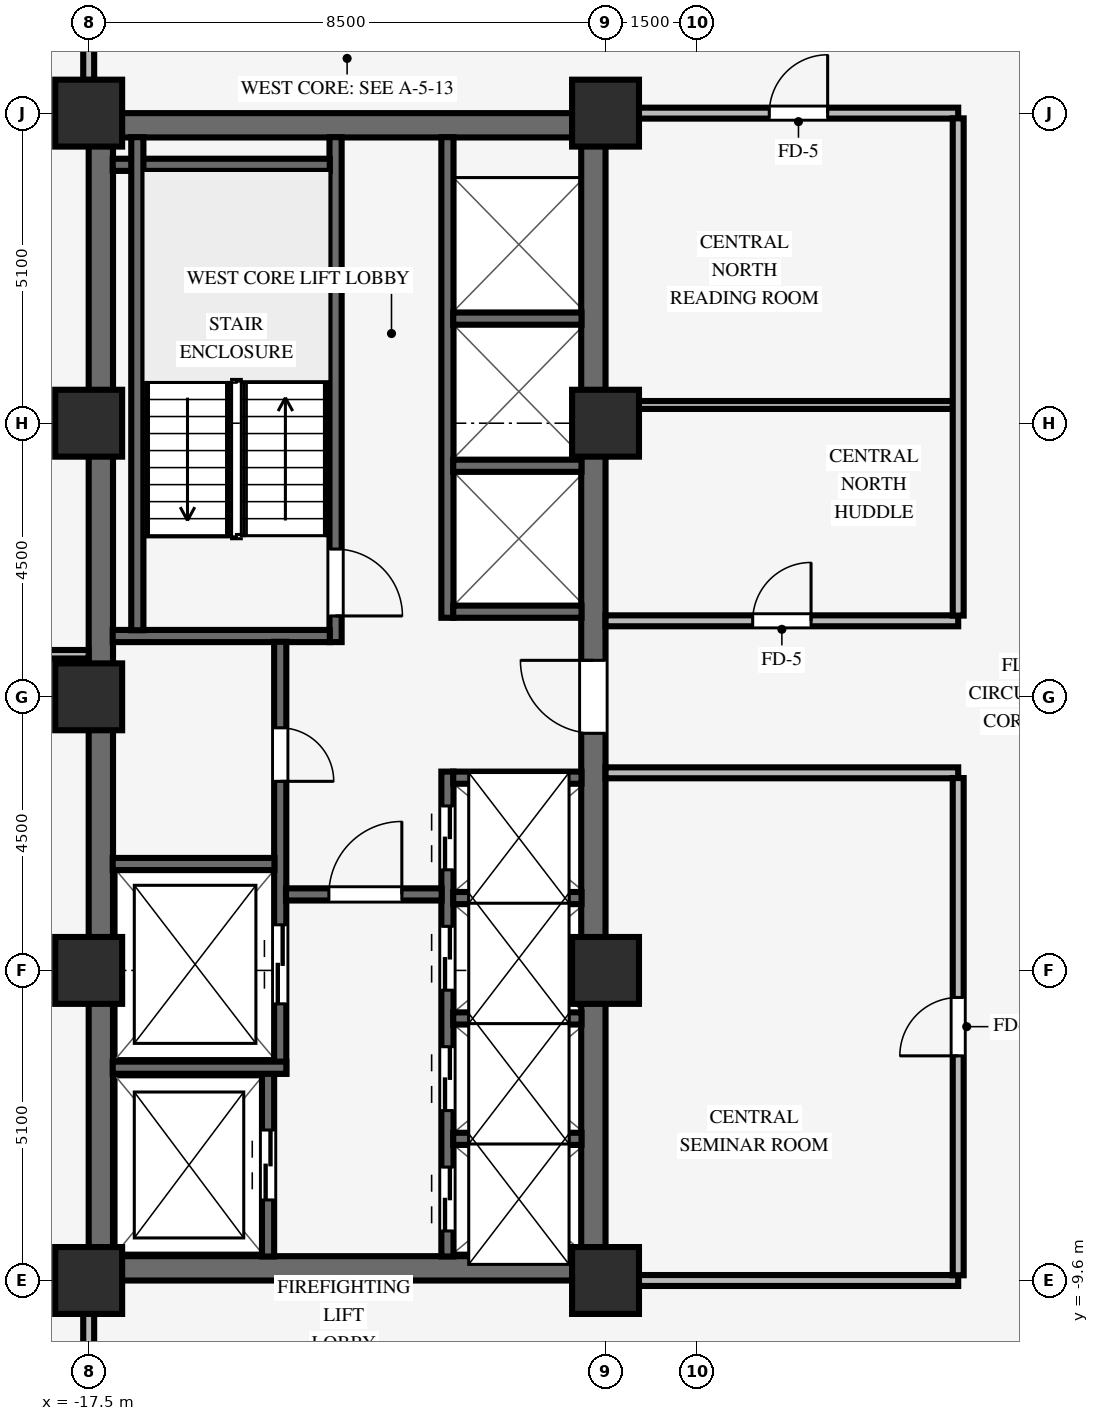
"""IFC4 building model, lengths in metres.
Left out: names, types, materials, properties, quantities, classifications, styles, units other than length and angle.
Written with IfcOpenShell. Run it as: python <this file> out.ifc"""

import sys

from ifc_helpers import new_model, si_unit, direction, frame, frame_2d, origin, origin_2d, place, context, subcontext, project, spatial, rectangle, extrude, source, transform, mapped, element, fill, save


model = new_model("IFC4")
c1 = context("Model", 3, precision=1e-05, world=origin(), true_north=direction((0.0, 1.0)))
c2 = subcontext(c1, "Body", "Model", "MODEL_VIEW")
j1 = project(units=[si_unit("LENGTHUNIT", "METRE"), si_unit("PLANEANGLEUNIT", "RADIAN")], contexts=[c1])
p1 = place(None, origin())
s1 = spatial("IfcSite", under=j1, at=p1, CompositionType="ELEMENT")
p2 = place(p1, origin())
s2 = spatial("IfcBuilding", under=s1, at=p2, CompositionType="ELEMENT")
p3 = place(p2, frame((0.0, 0.0, 105.6)))
s3 = spatial("IfcBuildingStorey", under=s2, at=p3, CompositionType="ELEMENT", Elevation=105.6)
for number, where, z_axis, x_axis in (
    (1, (-17.5, -9.4, 0.0), (0.0, 0.0, 1.0), (1.0, 0.0, 0.0)),
    (2, (-17.5, 9.4, 0.0), (0.0, 0.0, 1.0), (1.0, 0.0, 0.0)),
):
    element("IfcWall", number, at=place(p3, frame(where, z_axis=z_axis, x_axis=x_axis)), inside=s3, PredefinedType="SHEAR", context=c2, shape_type="SweptSolid", body=[
        extrude(rectangle(XDim=8.5, YDim=0.4, at=frame_2d((4.25, 0.0))), origin(), (0.0, 0.0, 1.0), 3.37),
    ])
p4 = place(p3, frame((-17.3, -9.205, 0.0), z_axis=(0.0, 0.0, 1.0), x_axis=(0.0, 1.0, 0.0)))
e3 = element("IfcWall", 3, at=p4, inside=s3, PredefinedType="SHEAR", context=c2, shape_type="SweptSolid", body=[
    extrude(rectangle(XDim=18.41, YDim=0.4, at=frame_2d((9.205, 0.0))), origin(), (0.0, 0.0, 1.0), 3.37),
])
p5 = place(p3, frame((-9.2, -9.205, 0.0), z_axis=(0.0, 0.0, 1.0), x_axis=(0.0, 1.0, 0.0)))
e4 = element("IfcWall", 4, at=p5, inside=s3, PredefinedType="SHEAR", context=c2, shape_type="SweptSolid", body=[
    extrude(rectangle(XDim=18.41, YDim=0.4, at=frame_2d((9.205, 0.0))), origin(), (0.0, 0.0, 1.0), 3.37),
])
p6 = place(p5, frame((8.605, 0.0, 0.0)))
e5 = element("IfcOpeningElement", 5, at=p6, cuts=e4, PredefinedType="OPENING", context=c2, shape_type="SweptSolid", body=[
    extrude(rectangle(XDim=1.2, YDim=2.15, at=frame_2d((0.6, 1.075))), frame((0.0, 0.21, 0.0), z_axis=(0.0, -1.0, 0.0), x_axis=(1.0, 0.0, 0.0)), (0.0, 0.0, 1.0), 0.42),
])
for number, where, z_axis, x_axis in (
    (6, (-17.5, -9.6, 0.0), (0.0, 0.0, 1.0), (1.0, 0.0, 0.0)),
    (7, (-17.5, -4.5, 0.0), (0.0, 0.0, 1.0), (1.0, 0.0, 0.0)),
    (8, (-17.5, 4.5, 0.0), (0.0, 0.0, 1.0), (1.0, 0.0, 0.0)),
    (9, (-17.5, 9.6, 0.0), (0.0, 0.0, 1.0), (1.0, 0.0, 0.0)),
    (10, (-9.0, -9.6, 0.0), (0.0, 0.0, 1.0), (1.0, 0.0, 0.0)),
    (11, (-9.0, -4.5, 0.0), (0.0, 0.0, 1.0), (1.0, 0.0, 0.0)),
    (12, (-9.0, 4.5, 0.0), (0.0, 0.0, 1.0), (1.0, 0.0, 0.0)),
    (13, (-9.0, 9.6, 0.0), (0.0, 0.0, 1.0), (1.0, 0.0, 0.0)),
    (14, (-17.5, 0.0, 0.0), (0.0, 0.0, 1.0), (1.0, 0.0, 0.0)),
):
    element("IfcColumn", number, at=place(p3, frame(where, z_axis=z_axis, x_axis=x_axis)), inside=s3, PredefinedType="COLUMN", context=c2, shape_type="SweptSolid", body=[
        extrude(rectangle(XDim=1.1, YDim=1.1, at=origin_2d()), origin(), (0.0, 0.0, 1.0), 3.37),
    ])
p7 = place(p3, frame((-13.44, 0.9, 0.0), z_axis=(0.0, 0.0, 1.0), x_axis=(0.0, 1.0, 0.0)))
e15 = element("IfcWall", 15, at=p7, inside=s3, PredefinedType="SHEAR", context=c2, shape_type="SweptSolid", body=[
    extrude(rectangle(XDim=8.305, YDim=0.2, at=frame_2d((4.153, 0.0))), origin(), (0.0, 0.0, 1.0), 3.37),
])
p8 = place(p7, frame((1.53, 0.0, 0.0), z_axis=(0.0, 0.0, 1.0), x_axis=(-1.0, 0.0, 0.0)))
e16 = element("IfcOpeningElement", 16, at=p8, cuts=e15, PredefinedType="OPENING", context=c2, shape_type="SweptSolid", body=[
    extrude(rectangle(XDim=1.1, YDim=2.15, at=frame_2d((0.55, 1.075))), frame((0.0, 0.11, 0.0), z_axis=(0.0, -1.0, 0.0), x_axis=(1.0, 0.0, 0.0)), (0.0, 0.0, 1.0), 0.22),
])
for number, where, z_axis, x_axis in (
    (17, (-17.105, 1.0, 0.0), (0.0, 0.0, 1.0), (1.0, 0.0, 0.0)),
    (18, (-17.105, 8.75, 0.0), (0.0, 0.0, 1.0), (1.0, 0.0, 0.0)),
):
    element("IfcWall", number, at=place(p3, frame(where, z_axis=z_axis, x_axis=x_axis)), inside=s3, PredefinedType="SHEAR", context=c2, shape_type="SweptSolid", body=[
        extrude(rectangle(XDim=3.57, YDim=0.2, at=frame_2d((1.785, 0.0))), origin(), (0.0, 0.0, 1.0), 3.37),
    ])
p9 = place(p3, frame((-16.7, 1.095, 0.0), z_axis=(0.0, 0.0, 1.0), x_axis=(0.0, 1.0, 0.0)))
e19 = element("IfcWall", 19, at=p9, inside=s3, PredefinedType="SHEAR", context=c2, shape_type="SweptSolid", body=[
    extrude(rectangle(XDim=8.11, YDim=0.2, at=frame_2d((4.055, 0.0))), origin(), (0.0, 0.0, 1.0), 3.37),
])
p10 = place(p3, frame((-14.55, -9.205, 0.0), z_axis=(0.0, 0.0, 1.0), x_axis=(0.0, 1.0, 0.0)))
e20 = element("IfcWall", 20, at=p10, inside=s3, PredefinedType="SHEAR", context=c2, shape_type="SweptSolid", body=[
    extrude(rectangle(XDim=3.01, YDim=0.2, at=frame_2d((1.505, 0.0))), origin(), (0.0, 0.0, 1.0), 3.37),
])
p11 = place(p10, frame((0.93, 0.0, 0.0)))
e21 = element("IfcOpeningElement", 21, at=p11, cuts=e20, PredefinedType="OPENING", context=c2, shape_type="SweptSolid", body=[
    extrude(rectangle(XDim=1.15, YDim=2.15, at=frame_2d((0.575, 1.075))), frame((0.0, 0.11, 0.0), z_axis=(0.0, -1.0, 0.0), x_axis=(1.0, 0.0, 0.0)), (0.0, 0.0, 1.0), 0.22),
])
p12 = place(p3, frame((-14.35, -6.2, 0.0), z_axis=(0.0, 0.0, 1.0), x_axis=(0.0, 1.0, 0.0)))
e22 = element("IfcWall", 22, at=p12, inside=s3, PredefinedType="SHEAR", context=c2, shape_type="SweptSolid", body=[
    extrude(rectangle(XDim=7.105, YDim=0.2, at=frame_2d((3.552, 0.0))), origin(), (0.0, 0.0, 1.0), 3.37),
])
p13 = place(p12, frame((5.69, 0.0, 0.0), z_axis=(0.0, 0.0, 1.0), x_axis=(-1.0, 0.0, 0.0)))
e23 = element("IfcOpeningElement", 23, at=p13, cuts=e22, PredefinedType="OPENING", context=c2, shape_type="SweptSolid", body=[
    extrude(rectangle(XDim=0.88, YDim=2.1, at=frame_2d((0.44, 1.05))), frame((0.0, 0.11, 0.0), z_axis=(0.0, -1.0, 0.0), x_axis=(1.0, 0.0, 0.0)), (0.0, 0.0, 1.0), 0.22),
])
p14 = place(p12, frame((1.15, 0.0, 0.0)))
e24 = element("IfcOpeningElement", 24, at=p14, cuts=e22, PredefinedType="OPENING", context=c2, shape_type="SweptSolid", body=[
    extrude(rectangle(XDim=1.3, YDim=2.2, at=frame_2d((0.65, 1.1))), frame((0.0, 0.11, 0.0), z_axis=(0.0, -1.0, 0.0), x_axis=(1.0, 0.0, 0.0)), (0.0, 0.0, 1.0), 0.22),
])
p15 = place(p3, frame((-17.105, -6.1, 0.0), z_axis=(0.0, 0.0, 1.0), x_axis=(1.0, 0.0, 0.0)))
e25 = element("IfcWall", 25, at=p15, inside=s3, PredefinedType="SHEAR", context=c2, shape_type="SweptSolid", body=[
    extrude(rectangle(XDim=2.855, YDim=0.2, at=frame_2d((1.427, 0.0))), origin(), (0.0, 0.0, 1.0), 3.37),
])
p16 = place(p3, frame((-17.105, -2.75, 0.0), z_axis=(0.0, 0.0, 1.0), x_axis=(1.0, 0.0, 0.0)))
e26 = element("IfcWall", 26, at=p16, inside=s3, PredefinedType="SHEAR", context=c2, shape_type="SweptSolid", body=[
    extrude(rectangle(XDim=2.66, YDim=0.2, at=frame_2d((1.33, 0.0))), origin(), (0.0, 0.0, 1.0), 3.37),
])
p17 = place(p3, frame((-11.6, -9.205, 0.0), z_axis=(0.0, 0.0, 1.0), x_axis=(0.0, 1.0, 0.0)))
e27 = element("IfcWall", 27, at=p17, inside=s3, PredefinedType="SHEAR", context=c2, shape_type="SweptSolid", body=[
    extrude(rectangle(XDim=7.975, YDim=0.2, at=frame_2d((3.988, 0.0))), origin(), (0.0, 0.0, 1.0), 3.37),
])
p18 = place(p17, frame((0.42, 0.0, 0.0)))
e28 = element("IfcOpeningElement", 28, at=p18, cuts=e27, PredefinedType="OPENING", context=c2, shape_type="SweptSolid", body=[
    extrude(rectangle(XDim=1.05, YDim=2.15, at=frame_2d((0.525, 1.075))), frame((0.0, 0.11, 0.0), z_axis=(0.0, -1.0, 0.0), x_axis=(1.0, 0.0, 0.0)), (0.0, 0.0, 1.0), 0.22),
])
p19 = place(p17, frame((2.4, 0.0, 0.0)))
e29 = element("IfcOpeningElement", 29, at=p19, cuts=e27, PredefinedType="OPENING", context=c2, shape_type="SweptSolid", body=[
    extrude(rectangle(XDim=1.05, YDim=2.15, at=frame_2d((0.525, 1.075))), frame((0.0, 0.11, 0.0), z_axis=(0.0, -1.0, 0.0), x_axis=(1.0, 0.0, 0.0)), (0.0, 0.0, 1.0), 0.22),
])
p20 = place(p17, frame((4.38, 0.0, 0.0)))
e30 = element("IfcOpeningElement", 30, at=p20, cuts=e27, PredefinedType="OPENING", context=c2, shape_type="SweptSolid", body=[
    extrude(rectangle(XDim=1.05, YDim=2.15, at=frame_2d((0.525, 1.075))), frame((0.0, 0.11, 0.0), z_axis=(0.0, -1.0, 0.0), x_axis=(1.0, 0.0, 0.0)), (0.0, 0.0, 1.0), 0.22),
])
p21 = place(p17, frame((6.36, 0.0, 0.0)))
e31 = element("IfcOpeningElement", 31, at=p21, cuts=e27, PredefinedType="OPENING", context=c2, shape_type="SweptSolid", body=[
    extrude(rectangle(XDim=1.05, YDim=2.15, at=frame_2d((0.525, 1.075))), frame((0.0, 0.11, 0.0), z_axis=(0.0, -1.0, 0.0), x_axis=(1.0, 0.0, 0.0)), (0.0, 0.0, 1.0), 0.22),
])
p22 = place(p3, frame((-14.255, -3.25, 0.0), z_axis=(0.0, 0.0, 1.0), x_axis=(1.0, 0.0, 0.0)))
e32 = element("IfcWall", 32, at=p22, inside=s3, PredefinedType="SHEAR", context=c2, shape_type="SweptSolid", body=[
    extrude(rectangle(XDim=2.56, YDim=0.2, at=frame_2d((1.28, 0.0))), origin(), (0.0, 0.0, 1.0), 3.37),
])
p23 = place(p22, frame((0.705, 0.0, 0.0)))
e33 = element("IfcOpeningElement", 33, at=p23, cuts=e32, PredefinedType="OPENING", context=c2, shape_type="SweptSolid", body=[
    extrude(rectangle(XDim=1.2, YDim=2.15, at=frame_2d((0.6, 1.075))), frame((0.0, 0.11, 0.0), z_axis=(0.0, -1.0, 0.0), x_axis=(1.0, 0.0, 0.0)), (0.0, 0.0, 1.0), 0.22),
])
for number, where, z_axis, x_axis in (
    (34, (-11.505, -7.27, 0.0), (0.0, 0.0, 1.0), (1.0, 0.0, 0.0)),
    (35, (-11.505, -5.29, 0.0), (0.0, 0.0, 1.0), (1.0, 0.0, 0.0)),
    (36, (-11.505, -3.31, 0.0), (0.0, 0.0, 1.0), (1.0, 0.0, 0.0)),
    (37, (-11.505, -1.33, 0.0), (0.0, 0.0, 1.0), (1.0, 0.0, 0.0)),
):
    element("IfcWall", number, at=place(p3, frame(where, z_axis=z_axis, x_axis=x_axis)), inside=s3, PredefinedType="SHEAR", context=c2, shape_type="SweptSolid", body=[
        extrude(rectangle(XDim=2.11, YDim=0.2, at=frame_2d((1.055, 0.0))), origin(), (0.0, 0.0, 1.0), 3.37),
    ])
p24 = place(p3, frame((-11.6, 1.3, 0.0), z_axis=(0.0, 0.0, 1.0), x_axis=(0.0, 1.0, 0.0)))
e38 = element("IfcWall", 38, at=p24, inside=s3, PredefinedType="SHEAR", context=c2, shape_type="SweptSolid", body=[
    extrude(rectangle(XDim=7.905, YDim=0.2, at=frame_2d((3.953, 0.0))), origin(), (0.0, 0.0, 1.0), 3.37),
])
for number, where, z_axis, x_axis in (
    (39, (-11.505, 1.4, 0.0), (0.0, 0.0, 1.0), (1.0, 0.0, 0.0)),
    (40, (-11.505, 3.8, 0.0), (0.0, 0.0, 1.0), (1.0, 0.0, 0.0)),
    (41, (-11.505, 6.22, 0.0), (0.0, 0.0, 1.0), (1.0, 0.0, 0.0)),
):
    element("IfcWall", number, at=place(p3, frame(where, z_axis=z_axis, x_axis=x_axis)), inside=s3, PredefinedType="SHEAR", context=c2, shape_type="SweptSolid", body=[
        extrude(rectangle(XDim=2.11, YDim=0.2, at=frame_2d((1.055, 0.0))), origin(), (0.0, 0.0, 1.0), 3.37),
    ])
p25 = place(p3, frame((-8.454, -9.6, 0.0), z_axis=(0.0, 0.0, 1.0), x_axis=(1.0, 0.0, 0.0)))
e42 = element("IfcWall", 42, at=p25, inside=s3, PredefinedType="PARTITIONING", context=c2, shape_type="SweptSolid", body=[
    extrude(rectangle(XDim=5.254, YDim=0.18, at=frame_2d((2.627, 0.0))), origin(), (0.0, 0.0, 1.0), 2.405),
])
p26 = place(p3, frame((-9.0, -1.25, 0.0), z_axis=(0.0, 0.0, 1.0), x_axis=(1.0, 0.0, 0.0)))
e43 = element("IfcWall", 43, at=p26, inside=s3, PredefinedType="PARTITIONING", context=c2, shape_type="SweptSolid", body=[
    extrude(rectangle(XDim=5.8, YDim=0.18, at=frame_2d((2.9, 0.0))), origin(), (0.0, 0.0, 1.0), 3.36),
])
p27 = place(p3, frame((-23.68, 0.7, 0.0), z_axis=(0.0, 0.0, 1.0), x_axis=(1.0, 0.0, 0.0)))
e44 = element("IfcWall", 44, at=p27, inside=s3, PredefinedType="PARTITIONING", context=c2, shape_type="SweptSolid", body=[
    extrude(rectangle(XDim=6.18, YDim=0.14, at=frame_2d((3.09, 0.0))), origin(), (0.0, 0.0, 1.0), 3.36),
])
p28 = place(p3, frame((-9.0, 1.25, 0.0), z_axis=(0.0, 0.0, 1.0), x_axis=(1.0, 0.0, 0.0)))
e45 = element("IfcWall", 45, at=p28, inside=s3, PredefinedType="PARTITIONING", context=c2, shape_type="SweptSolid", body=[
    extrude(rectangle(XDim=5.8, YDim=0.18, at=frame_2d((2.9, 0.0))), origin(), (0.0, 0.0, 1.0), 3.36),
])
p29 = place(p28, frame((2.42, 0.0, 0.0)))
e46 = element("IfcOpeningElement", 46, at=p29, cuts=e45, PredefinedType="OPENING", context=c2, shape_type="SweptSolid", body=[
    extrude(rectangle(XDim=0.96, YDim=2.1, at=frame_2d((0.48, 1.05))), frame((0.0, 0.1, 0.0), z_axis=(0.0, -1.0, 0.0), x_axis=(1.0, 0.0, 0.0)), (0.0, 0.0, 1.0), 0.2),
])
p30 = place(p3, frame((-8.454, 4.8, 0.0), z_axis=(0.0, 0.0, 1.0), x_axis=(1.0, 0.0, 0.0)))
e47 = element("IfcWall", 47, at=p30, inside=s3, PredefinedType="PARTITIONING", context=c2, shape_type="SweptSolid", body=[
    extrude(rectangle(XDim=5.168, YDim=0.13, at=frame_2d((2.584, 0.0))), origin(), (0.0, 0.0, 1.0), 2.738),
])
p31 = place(p3, frame((-8.454, 9.6, 0.0), z_axis=(0.0, 0.0, 1.0), x_axis=(1.0, 0.0, 0.0)))
e48 = element("IfcWall", 48, at=p31, inside=s3, PredefinedType="PARTITIONING", context=c2, shape_type="SweptSolid", body=[
    extrude(rectangle(XDim=5.254, YDim=0.18, at=frame_2d((2.627, 0.0))), origin(), (0.0, 0.0, 1.0), 2.405),
])
p32 = place(p31, frame((2.147, 0.0, 0.0)))
e49 = element("IfcOpeningElement", 49, at=p32, cuts=e48, PredefinedType="OPENING", context=c2, shape_type="SweptSolid", body=[
    extrude(rectangle(XDim=0.96, YDim=2.1, at=frame_2d((0.48, 1.05))), frame((0.0, 0.1, 0.0), z_axis=(0.0, -1.0, 0.0), x_axis=(1.0, 0.0, 0.0)), (0.0, 0.0, 1.0), 0.2),
])
for number, where, z_axis, x_axis in (
    (50, (-17.5, -11.114, 0.0), (0.0, 0.0, 1.0), (0.0, 1.0, 0.0)),
    (51, (-17.5, 10.146, 0.0), (0.0, 0.0, 1.0), (0.0, 1.0, 0.0)),
):
    element("IfcWall", number, at=place(p3, frame(where, z_axis=z_axis, x_axis=x_axis)), inside=s3, PredefinedType="PARTITIONING", context=c2, shape_type="SweptSolid", body=[
        extrude(rectangle(XDim=0.968, YDim=0.18, at=frame_2d((0.484, 0.0))), origin(), (0.0, 0.0, 1.0), 2.738),
    ])
p33 = place(p3, frame((-3.2, -9.514, 0.0), z_axis=(0.0, 0.0, 1.0), x_axis=(0.0, 1.0, 0.0)))
e52 = element("IfcWall", 52, at=p33, inside=s3, PredefinedType="PARTITIONING", context=c2, shape_type="SweptSolid", body=[
    extrude(rectangle(XDim=8.178, YDim=0.18, at=frame_2d((4.089, 0.0))), origin(), (0.0, 0.0, 1.0), 3.36),
])
p34 = place(p33, frame((3.609, 0.0, 0.0)))
e53 = element("IfcOpeningElement", 53, at=p34, cuts=e52, PredefinedType="OPENING", context=c2, shape_type="SweptSolid", body=[
    extrude(rectangle(XDim=0.96, YDim=2.1, at=frame_2d((0.48, 1.05))), frame((0.0, 0.1, 0.0), z_axis=(0.0, -1.0, 0.0), x_axis=(1.0, 0.0, 0.0)), (0.0, 0.0, 1.0), 0.2),
])
p35 = place(p3, frame((-3.2, 1.336, 0.0), z_axis=(0.0, 0.0, 1.0), x_axis=(0.0, 1.0, 0.0)))
e54 = element("IfcWall", 54, at=p35, inside=s3, PredefinedType="PARTITIONING", context=c2, shape_type="SweptSolid", body=[
    extrude(rectangle(XDim=8.178, YDim=0.18, at=frame_2d((4.089, 0.0))), origin(), (0.0, 0.0, 1.0), 3.36),
])
m1 = source(origin(), c2, "Body", "SweptSolid", [
    extrude(rectangle(XDim=1.1, YDim=2.15, at=frame_2d((0.55, 1.075))), frame((0.0, 0.025, 0.0), z_axis=(0.0, -1.0, 0.0), x_axis=(1.0, 0.0, 0.0)), (0.0, 0.0, 1.0), 0.05),
])
p36 = place(p8, origin())
e55 = element("IfcDoor", 55, at=p36, inside=s3, OperationType="SINGLE_SWING_RIGHT", PredefinedType="DOOR", context=c2, shape_type="MappedRepresentation", body=[
    mapped(m1, transform((0.0, 0.0, 0.0), scale=1.0)),
])
fill(e16, e55)
m2 = source(origin(), c2, "Body", "SweptSolid", [
    extrude(rectangle(XDim=0.88, YDim=2.1, at=frame_2d((0.44, 1.05))), frame((0.0, 0.025, 0.0), z_axis=(0.0, -1.0, 0.0), x_axis=(1.0, 0.0, 0.0)), (0.0, 0.0, 1.0), 0.05),
])
p37 = place(p13, origin())
e56 = element("IfcDoor", 56, at=p37, inside=s3, OperationType="SINGLE_SWING_RIGHT", PredefinedType="DOOR", context=c2, shape_type="MappedRepresentation", body=[
    mapped(m2, transform((0.0, 0.0, 0.0), scale=1.0)),
])
fill(e23, e56)
m3 = source(origin(), c2, "Body", "SweptSolid", [
    extrude(rectangle(XDim=1.2, YDim=2.15, at=frame_2d((0.6, 1.075))), frame((0.0, 0.025, 0.0), z_axis=(0.0, -1.0, 0.0), x_axis=(1.0, 0.0, 0.0)), (0.0, 0.0, 1.0), 0.05),
])
p38 = place(p23, origin())
e57 = element("IfcDoor", 57, at=p38, inside=s3, OperationType="SINGLE_SWING_RIGHT", PredefinedType="DOOR", context=c2, shape_type="MappedRepresentation", body=[
    mapped(m3, transform((0.0, 0.0, 0.0), scale=1.0)),
])
fill(e33, e57)
p39 = place(p6, origin())
e58 = element("IfcDoor", 58, at=p39, inside=s3, OperationType="SINGLE_SWING_RIGHT", PredefinedType="DOOR", context=c2, shape_type="MappedRepresentation", body=[
    mapped(m3, transform((0.0, 0.0, 0.0), scale=1.0)),
])
fill(e5, e58)
m4 = source(origin(), c2, "Body", "SweptSolid", [
    extrude(rectangle(XDim=1.15, YDim=2.15, at=frame_2d((0.575, 1.075))), frame((0.0, 0.025, 0.0), z_axis=(0.0, -1.0, 0.0), x_axis=(1.0, 0.0, 0.0)), (0.0, 0.0, 1.0), 0.05),
])
p40 = place(p11, origin())
e59 = element("IfcDoor", 59, at=p40, inside=s3, OperationType="DOUBLE_DOOR_SLIDING", PredefinedType="DOOR", context=c2, shape_type="MappedRepresentation", body=[
    mapped(m4, transform((0.0, 0.0, 0.0), scale=1.0)),
])
fill(e21, e59)
m5 = source(origin(), c2, "Body", "SweptSolid", [
    extrude(rectangle(XDim=1.3, YDim=2.2, at=frame_2d((0.65, 1.1))), frame((0.0, 0.025, 0.0), z_axis=(0.0, -1.0, 0.0), x_axis=(1.0, 0.0, 0.0)), (0.0, 0.0, 1.0), 0.05),
])
p41 = place(p14, origin())
e60 = element("IfcDoor", 60, at=p41, inside=s3, OperationType="DOUBLE_DOOR_SLIDING", PredefinedType="DOOR", context=c2, shape_type="MappedRepresentation", body=[
    mapped(m5, transform((0.0, 0.0, 0.0), scale=1.0)),
])
fill(e24, e60)
m6 = source(origin(), c2, "Body", "SweptSolid", [
    extrude(rectangle(XDim=1.05, YDim=2.15, at=frame_2d((0.525, 1.075))), frame((0.0, 0.025, 0.0), z_axis=(0.0, -1.0, 0.0), x_axis=(1.0, 0.0, 0.0)), (0.0, 0.0, 1.0), 0.05),
])
p42 = place(p18, origin())
e61 = element("IfcDoor", 61, at=p42, inside=s3, OperationType="DOUBLE_DOOR_SLIDING", PredefinedType="DOOR", context=c2, shape_type="MappedRepresentation", body=[
    mapped(m6, transform((0.0, 0.0, 0.0), scale=1.0)),
])
fill(e28, e61)
p43 = place(p19, origin())
e62 = element("IfcDoor", 62, at=p43, inside=s3, OperationType="DOUBLE_DOOR_SLIDING", PredefinedType="DOOR", context=c2, shape_type="MappedRepresentation", body=[
    mapped(m6, transform((0.0, 0.0, 0.0), scale=1.0)),
])
fill(e29, e62)
p44 = place(p20, origin())
e63 = element("IfcDoor", 63, at=p44, inside=s3, OperationType="DOUBLE_DOOR_SLIDING", PredefinedType="DOOR", context=c2, shape_type="MappedRepresentation", body=[
    mapped(m6, transform((0.0, 0.0, 0.0), scale=1.0)),
])
fill(e30, e63)
p45 = place(p21, origin())
e64 = element("IfcDoor", 64, at=p45, inside=s3, OperationType="DOUBLE_DOOR_SLIDING", PredefinedType="DOOR", context=c2, shape_type="MappedRepresentation", body=[
    mapped(m6, transform((0.0, 0.0, 0.0), scale=1.0)),
])
fill(e31, e64)
m7 = source(origin(), c2, "Body", "SweptSolid", [
    extrude(rectangle(XDim=0.96, YDim=2.1, at=frame_2d((0.48, 1.05))), frame((0.0, 0.025, 0.0), z_axis=(0.0, -1.0, 0.0), x_axis=(1.0, 0.0, 0.0)), (0.0, 0.0, 1.0), 0.05),
])
p46 = place(p34, origin())
e65 = element("IfcDoor", 65, at=p46, inside=s3, OperationType="SINGLE_SWING_LEFT", PredefinedType="DOOR", context=c2, shape_type="MappedRepresentation", body=[
    mapped(m7, transform((0.0, 0.0, 0.0), scale=1.0)),
])
fill(e53, e65)
p47 = place(p29, origin())
e66 = element("IfcDoor", 66, at=p47, inside=s3, OperationType="SINGLE_SWING_RIGHT", PredefinedType="DOOR", context=c2, shape_type="MappedRepresentation", body=[
    mapped(m7, transform((0.0, 0.0, 0.0), scale=1.0)),
])
fill(e46, e66)
p48 = place(p32, origin())
e67 = element("IfcDoor", 67, at=p48, inside=s3, OperationType="SINGLE_SWING_RIGHT", PredefinedType="DOOR", context=c2, shape_type="MappedRepresentation", body=[
    mapped(m7, transform((0.0, 0.0, 0.0), scale=1.0)),
])
fill(e49, e67)
save(model, sys.argv[1])
